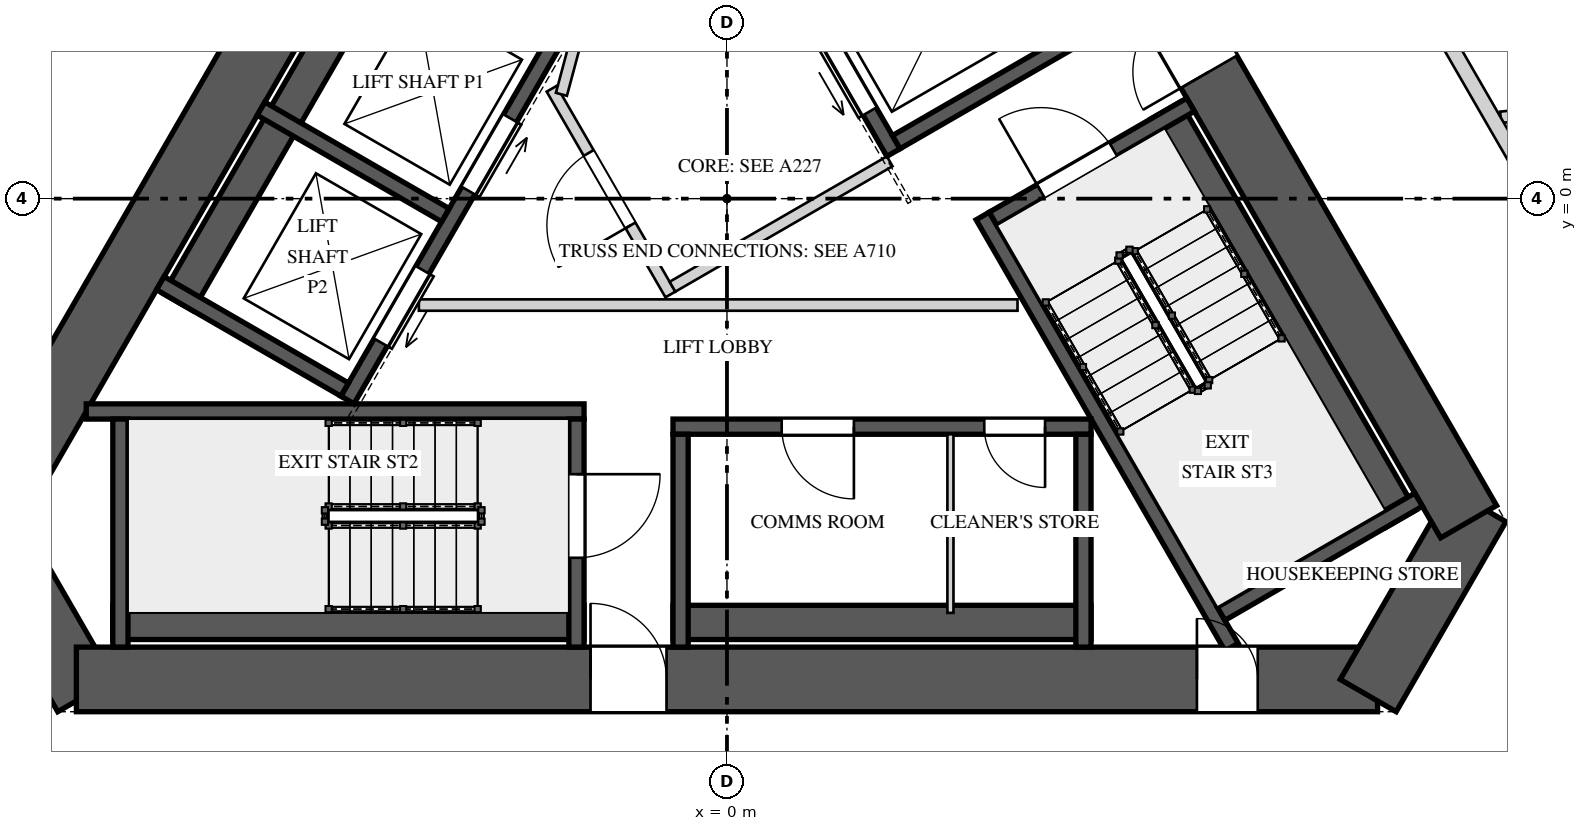
"""IFC4 building model, lengths in metres.
Left out: names, types, materials, properties, quantities, classifications, styles, units other than length and angle.
Written with IfcOpenShell. Run it as: python <this file> out.ifc"""

import sys

from ifc_helpers import new_model, si_unit, direction, frame, frame_2d, origin, place, context, subcontext, project, spatial, rectangle, extrude, element, fill, save


model = new_model("IFC4")
c1 = context("Model", 3, precision=1e-05, world=origin(), true_north=direction((0.0, 1.0)))
c2 = subcontext(c1, "Body", "Model", "MODEL_VIEW")
j1 = project(units=[si_unit("LENGTHUNIT", "METRE"), si_unit("PLANEANGLEUNIT", "RADIAN")], contexts=[c1])
p1 = place(None, origin())
s1 = spatial("IfcSite", under=j1, at=p1, CompositionType="ELEMENT")
p2 = place(p1, origin())
s2 = spatial("IfcBuilding", under=s1, at=p2, CompositionType="ELEMENT")
p3 = place(p2, frame((0.0, 0.0, 194.8)))
s3 = spatial("IfcBuildingStorey", under=s2, at=p3, CompositionType="ELEMENT", Elevation=194.8)
p4 = place(p3, frame((-1.198, 10.575, 0.0), z_axis=(0.0, 0.0, 1.0), x_axis=(-0.499995289315, -0.866028123483, 0.0)))
e1 = element("IfcWall", 1, at=p4, inside=s3, PredefinedType="SHEAR", context=c2, shape_type="SweptSolid", body=[
    extrude(rectangle(XDim=17.118, YDim=0.85, at=frame_2d((8.559, 0.0))), origin(), (0.0, 0.0, 1.0), 5.2),
])
p5 = place(p4, frame((6.764, 0.0, 0.0)))
e2 = element("IfcOpeningElement", 2, at=p5, cuts=e1, PredefinedType="OPENING", context=c2, shape_type="SweptSolid", body=[
    extrude(rectangle(XDim=1.0, YDim=2.4, at=frame_2d((0.5, 1.2))), frame((0.0, 0.435, 0.0), z_axis=(0.0, -1.0, 0.0), x_axis=(1.0, 0.0, 0.0)), (0.0, 0.0, 1.0), 0.87),
])
p6 = place(p3, frame((-9.88, -4.038, 0.0), z_axis=(0.0, 0.0, 1.0), x_axis=(0.499995765644, -0.866027848477, 0.0)))
e3 = element("IfcWall", 3, at=p6, inside=s3, PredefinedType="SHEAR", context=c2, shape_type="SweptSolid", body=[
    extrude(rectangle(XDim=2.887, YDim=0.85, at=frame_2d((1.443, 0.0))), origin(), (0.0, 0.0, 1.0), 5.2),
])
p7 = place(p3, frame((-8.559, -6.325, 0.0), z_axis=(0.0, 0.0, 1.0), x_axis=(1.0, 0.0, 0.0)))
e4 = element("IfcWall", 4, at=p7, inside=s3, PredefinedType="SHEAR", context=c2, shape_type="SweptSolid", body=[
    extrude(rectangle(XDim=17.118, YDim=0.85, at=frame_2d((8.559, 0.0))), origin(), (0.0, 0.0, 1.0), 5.2),
])
p8 = place(p7, frame((6.764, 0.0, 0.0)))
e5 = element("IfcOpeningElement", 5, at=p8, cuts=e4, PredefinedType="OPENING", context=c2, shape_type="SweptSolid", body=[
    extrude(rectangle(XDim=1.0, YDim=2.4, at=frame_2d((0.5, 1.2))), frame((0.0, 0.435, 0.0), z_axis=(0.0, -1.0, 0.0), x_axis=(1.0, 0.0, 0.0)), (0.0, 0.0, 1.0), 0.87),
])
p9 = place(p7, frame((14.742, 0.0, 0.0)))
e6 = element("IfcOpeningElement", 6, at=p9, cuts=e4, PredefinedType="OPENING", context=c2, shape_type="SweptSolid", body=[
    extrude(rectangle(XDim=0.8, YDim=2.1, at=frame_2d((0.4, 1.05))), frame((0.0, 0.435, 0.0), z_axis=(0.0, -1.0, 0.0), x_axis=(1.0, 0.0, 0.0)), (0.0, 0.0, 1.0), 0.87),
])
p10 = place(p3, frame((8.437, -6.538, 0.0), z_axis=(0.0, 0.0, 1.0), x_axis=(0.499995765644, 0.866027848477, 0.0)))
e7 = element("IfcWall", 7, at=p10, inside=s3, PredefinedType="SHEAR", context=c2, shape_type="SweptSolid", body=[
    extrude(rectangle(XDim=2.887, YDim=0.85, at=frame_2d((1.443, 0.0))), origin(), (0.0, 0.0, 1.0), 5.2),
])
p11 = place(p3, frame((9.757, -4.25, 0.0), z_axis=(0.0, 0.0, 1.0), x_axis=(-0.499995289315, 0.866028123483, 0.0)))
e8 = element("IfcWall", 8, at=p11, inside=s3, PredefinedType="SHEAR", context=c2, shape_type="SweptSolid", body=[
    extrude(rectangle(XDim=17.118, YDim=0.85, at=frame_2d((8.559, 0.0))), origin(), (0.0, 0.0, 1.0), 5.2),
])
p12 = place(p11, frame((6.834, 0.0, 0.0)))
e9 = element("IfcOpeningElement", 9, at=p12, cuts=e8, PredefinedType="OPENING", context=c2, shape_type="SweptSolid", body=[
    extrude(rectangle(XDim=1.0, YDim=2.4, at=frame_2d((0.5, 1.2))), frame((0.0, 0.435, 0.0), z_axis=(0.0, -1.0, 0.0), x_axis=(1.0, 0.0, 0.0)), (0.0, 0.0, 1.0), 0.87),
])
p13 = place(p11, frame((14.252, 0.0, 0.0)))
e10 = element("IfcOpeningElement", 10, at=p13, cuts=e8, PredefinedType="OPENING", context=c2, shape_type="SweptSolid", body=[
    extrude(rectangle(XDim=0.8, YDim=2.1, at=frame_2d((0.4, 1.05))), frame((0.0, 0.435, 0.0), z_axis=(0.0, -1.0, 0.0), x_axis=(1.0, 0.0, 0.0)), (0.0, 0.0, 1.0), 0.87),
])
p14 = place(p3, frame((-8.08, -5.575, 0.0), z_axis=(0.0, 0.0, 1.0), x_axis=(1.0, 0.0, 0.0)))
e11 = element("IfcWall", 11, at=p14, inside=s3, PredefinedType="SOLIDWALL", context=c2, shape_type="SweptSolid", body=[
    extrude(rectangle(XDim=6.2, YDim=0.45, at=frame_2d((3.1, 0.0))), origin(), (0.0, 0.0, 1.0), 4.85),
])
p15 = place(p3, frame((-8.429, -2.8, 0.0), z_axis=(0.0, 0.0, 1.0), x_axis=(1.0, 0.0, 0.0)))
e12 = element("IfcWall", 12, at=p15, inside=s3, PredefinedType="SOLIDWALL", context=c2, shape_type="SweptSolid", body=[
    extrude(rectangle(XDim=6.549, YDim=0.2, at=frame_2d((3.275, 0.0))), origin(), (0.0, 0.0, 1.0), 4.85),
])
p16 = place(p3, frame((-7.98, -2.9, 0.0), z_axis=(0.0, 0.0, 1.0), x_axis=(0.0, -1.0, 0.0)))
e13 = element("IfcWall", 13, at=p16, inside=s3, PredefinedType="SOLIDWALL", context=c2, shape_type="SweptSolid", body=[
    extrude(rectangle(XDim=3.0, YDim=0.2, at=frame_2d((1.5, 0.0))), origin(), (0.0, 0.0, 1.0), 4.85),
])
p17 = place(p3, frame((-1.98, -2.9, 0.0), z_axis=(0.0, 0.0, 1.0), x_axis=(0.0, -1.0, 0.0)))
e14 = element("IfcWall", 14, at=p17, inside=s3, PredefinedType="SOLIDWALL", context=c2, shape_type="SweptSolid", body=[
    extrude(rectangle(XDim=3.0, YDim=0.2, at=frame_2d((1.5, 0.0))), origin(), (0.0, 0.0, 1.0), 4.85),
])
p18 = place(p17, frame((0.725, 0.0, 0.0)))
e15 = element("IfcOpeningElement", 15, at=p18, cuts=e14, PredefinedType="OPENING", context=c2, shape_type="SweptSolid", body=[
    extrude(rectangle(XDim=1.1, YDim=2.4, at=frame_2d((0.55, 1.2))), frame((0.0, 0.11, 0.0), z_axis=(0.0, -1.0, 0.0), x_axis=(1.0, 0.0, 0.0)), (0.0, 0.0, 1.0), 0.22),
])
p19 = place(p3, frame((8.868, -4.21, 0.0), z_axis=(0.0, 0.0, 1.0), x_axis=(-0.500009909098, 0.866019682689, 0.0)))
e16 = element("IfcWall", 16, at=p19, inside=s3, PredefinedType="SOLIDWALL", context=c2, shape_type="SweptSolid", body=[
    extrude(rectangle(XDim=6.2, YDim=0.45, at=frame_2d((3.1, 0.0))), origin(), (0.0, 0.0, 1.0), 4.85),
])
p20 = place(p3, frame((6.64, -5.9, 0.0), z_axis=(0.0, 0.0, 1.0), x_axis=(-0.499999959354, 0.866025427251, 0.0)))
e17 = element("IfcWall", 17, at=p20, inside=s3, PredefinedType="SOLIDWALL", context=c2, shape_type="SweptSolid", body=[
    extrude(rectangle(XDim=6.549, YDim=0.2, at=frame_2d((3.275, 0.0))), origin(), (0.0, 0.0, 1.0), 4.85),
])
p21 = place(p3, frame((6.501, -5.461, 0.0), z_axis=(0.0, 0.0, 1.0), x_axis=(0.866031096941, 0.499990139034, 0.0)))
e18 = element("IfcWall", 18, at=p21, inside=s3, PredefinedType="SOLIDWALL", context=c2, shape_type="SweptSolid", body=[
    extrude(rectangle(XDim=3.0, YDim=0.2, at=frame_2d((1.5, 0.0))), origin(), (0.0, 0.0, 1.0), 4.85),
])
p22 = place(p3, frame((3.501, -0.265, 0.0), z_axis=(0.0, 0.0, 1.0), x_axis=(0.866031096941, 0.499990139034, 0.0)))
e19 = element("IfcWall", 19, at=p22, inside=s3, PredefinedType="SOLIDWALL", context=c2, shape_type="SweptSolid", body=[
    extrude(rectangle(XDim=3.0, YDim=0.2, at=frame_2d((1.5, 0.0))), origin(), (0.0, 0.0, 1.0), 4.85),
])
p23 = place(p22, frame((0.725, 0.0, 0.0)))
e20 = element("IfcOpeningElement", 20, at=p23, cuts=e19, PredefinedType="OPENING", context=c2, shape_type="SweptSolid", body=[
    extrude(rectangle(XDim=1.1, YDim=2.4, at=frame_2d((0.55, 1.2))), frame((0.0, 0.11, 0.0), z_axis=(0.0, -1.0, 0.0), x_axis=(1.0, 0.0, 0.0)), (0.0, 0.0, 1.0), 0.22),
])
p24 = place(p3, frame((-2.243, 2.115, 0.0), z_axis=(0.0, 0.0, 1.0), x_axis=(-0.499996545922, -0.866027397988, 0.0)))
e21 = element("IfcWall", 21, at=p24, inside=s3, PredefinedType="SOLIDWALL", context=c2, shape_type="SweptSolid", body=[
    extrude(rectangle(XDim=5.5, YDim=0.2, at=frame_2d((2.75, 0.0))), origin(), (0.0, 0.0, 1.0), 4.85),
])
p25 = place(p24, frame((1.22, 0.0, 0.0)))
e22 = element("IfcOpeningElement", 22, at=p25, cuts=e21, PredefinedType="OPENING", context=c2, shape_type="SweptSolid", body=[
    extrude(rectangle(XDim=1.1, YDim=2.1, at=frame_2d((0.55, 1.05))), frame((0.0, 0.11, 0.0), z_axis=(0.0, -1.0, 0.0), x_axis=(1.0, 0.0, 0.0)), (0.0, 0.0, 1.0), 0.22),
])
p26 = place(p24, frame((3.525, 0.0, 0.0)))
e23 = element("IfcOpeningElement", 23, at=p26, cuts=e21, PredefinedType="OPENING", context=c2, shape_type="SweptSolid", body=[
    extrude(rectangle(XDim=1.1, YDim=2.1, at=frame_2d((0.55, 1.05))), frame((0.0, 0.11, 0.0), z_axis=(0.0, -1.0, 0.0), x_axis=(1.0, 0.0, 0.0)), (0.0, 0.0, 1.0), 0.22),
])
p27 = place(p3, frame((-4.473, 3.402, 0.0), z_axis=(0.0, 0.0, 1.0), x_axis=(-0.499996545922, -0.866027397988, 0.0)))
e24 = element("IfcWall", 24, at=p27, inside=s3, PredefinedType="SOLIDWALL", context=c2, shape_type="SweptSolid", body=[
    extrude(rectangle(XDim=5.5, YDim=0.45, at=frame_2d((2.75, 0.0))), origin(), (0.0, 0.0, 1.0), 4.85),
])
p28 = place(p3, frame((-3.705, -0.217, 0.0), z_axis=(0.0, 0.0, 1.0), x_axis=(-0.866018616679, 0.500011755427, 0.0)))
e25 = element("IfcWall", 25, at=p28, inside=s3, PredefinedType="SOLIDWALL", context=c2, shape_type="SweptSolid", body=[
    extrude(rectangle(XDim=2.8, YDim=0.2, at=frame_2d((1.4, 0.0))), origin(), (0.0, 0.0, 1.0), 4.85),
])
p29 = place(p3, frame((-5.03, -2.512, 0.0), z_axis=(0.0, 0.0, 1.0), x_axis=(-0.865996816683, 0.500049511043, 0.0)))
e26 = element("IfcWall", 26, at=p29, inside=s3, PredefinedType="SOLIDWALL", context=c2, shape_type="SweptSolid", body=[
    extrude(rectangle(XDim=2.8, YDim=0.2, at=frame_2d((1.4, 0.0))), origin(), (0.0, 0.0, 1.0), 4.85),
])
p30 = place(p3, frame((4.79, -3.0, 0.0), z_axis=(0.0, 0.0, 1.0), x_axis=(-1.0, 0.0, 0.0)))
e27 = element("IfcWall", 27, at=p30, inside=s3, PredefinedType="SOLIDWALL", context=c2, shape_type="SweptSolid", body=[
    extrude(rectangle(XDim=5.5, YDim=0.2, at=frame_2d((2.75, 0.0))), origin(), (0.0, 0.0, 1.0), 4.85),
])
p31 = place(p30, frame((3.12, 0.0, 0.0)))
e28 = element("IfcOpeningElement", 28, at=p31, cuts=e27, PredefinedType="OPENING", context=c2, shape_type="SweptSolid", body=[
    extrude(rectangle(XDim=0.95, YDim=2.4, at=frame_2d((0.475, 1.2))), frame((0.0, 0.11, 0.0), z_axis=(0.0, -1.0, 0.0), x_axis=(1.0, 0.0, 0.0)), (0.0, 0.0, 1.0), 0.22),
])
p32 = place(p30, frame((0.605, 0.0, 0.0)))
e29 = element("IfcOpeningElement", 29, at=p32, cuts=e27, PredefinedType="OPENING", context=c2, shape_type="SweptSolid", body=[
    extrude(rectangle(XDim=0.8, YDim=2.1, at=frame_2d((0.4, 1.05))), frame((0.0, 0.11, 0.0), z_axis=(0.0, -1.0, 0.0), x_axis=(1.0, 0.0, 0.0)), (0.0, 0.0, 1.0), 0.22),
])
p33 = place(p3, frame((-0.71, -5.575, 0.0), z_axis=(0.0, 0.0, 1.0), x_axis=(1.0, 0.0, 0.0)))
e30 = element("IfcWall", 30, at=p33, inside=s3, PredefinedType="SOLIDWALL", context=c2, shape_type="SweptSolid", body=[
    extrude(rectangle(XDim=5.5, YDim=0.45, at=frame_2d((2.75, 0.0))), origin(), (0.0, 0.0, 1.0), 4.85),
])
for number, where, z_axis, x_axis in (
    (31, (-0.61, -3.1, 0.0), (0.0, 0.0, 1.0), (0.0, -1.0, 0.0)),
    (32, (4.69, -3.1, 0.0), (0.0, 0.0, 1.0), (0.0, -1.0, 0.0)),
):
    element("IfcWall", number, at=place(p3, frame(where, z_axis=z_axis, x_axis=x_axis)), inside=s3, PredefinedType="SOLIDWALL", context=c2, shape_type="SweptSolid", body=[
        extrude(rectangle(XDim=2.8, YDim=0.2, at=frame_2d((1.4, 0.0))), origin(), (0.0, 0.0, 1.0), 4.85),
    ])
p34 = place(p3, frame((2.94, -3.1, 0.0), z_axis=(0.0, 0.0, 1.0), x_axis=(0.0, -1.0, 0.0)))
e33 = element("IfcWall", 33, at=p34, inside=s3, PredefinedType="PARTITIONING", context=c2, shape_type="SweptSolid", body=[
    extrude(rectangle(XDim=2.35, YDim=0.08, at=frame_2d((1.175, 0.0))), origin(), (0.0, 0.0, 1.0), 4.85),
])
p35 = place(p3, frame((2.19, 0.606, 0.0), z_axis=(0.0, 0.0, 1.0), x_axis=(-0.500002801628, 0.866023786258, 0.0)))
e34 = element("IfcWall", 34, at=p35, inside=s3, PredefinedType="SOLIDWALL", context=c2, shape_type="SweptSolid", body=[
    extrude(rectangle(XDim=4.9, YDim=0.2, at=frame_2d((2.45, 0.0))), origin(), (0.0, 0.0, 1.0), 4.85),
])
p36 = place(p35, frame((0.625, 0.0, 0.0)))
e35 = element("IfcOpeningElement", 35, at=p36, cuts=e34, PredefinedType="OPENING", context=c2, shape_type="SweptSolid", body=[
    extrude(rectangle(XDim=1.3, YDim=2.1, at=frame_2d((0.65, 1.05))), frame((0.0, 0.11, 0.0), z_axis=(0.0, -1.0, 0.0), x_axis=(1.0, 0.0, 0.0)), (0.0, 0.0, 1.0), 0.22),
])
p37 = place(p35, frame((2.975, 0.0, 0.0)))
e36 = element("IfcOpeningElement", 36, at=p37, cuts=e34, PredefinedType="OPENING", context=c2, shape_type="SweptSolid", body=[
    extrude(rectangle(XDim=1.3, YDim=2.1, at=frame_2d((0.65, 1.05))), frame((0.0, 0.11, 0.0), z_axis=(0.0, -1.0, 0.0), x_axis=(1.0, 0.0, 0.0)), (0.0, 0.0, 1.0), 0.22),
])
p38 = place(p3, frame((2.227, 0.743, 0.0), z_axis=(0.0, 0.0, 1.0), x_axis=(0.866018442252, 0.500012057535, 0.0)))
e37 = element("IfcWall", 37, at=p38, inside=s3, PredefinedType="SOLIDWALL", context=c2, shape_type="SweptSolid", body=[
    extrude(rectangle(XDim=3.6, YDim=0.2, at=frame_2d((1.8, 0.0))), origin(), (0.0, 0.0, 1.0), 4.85),
])
p39 = place(p3, frame((-0.744, -1.261, 0.0), z_axis=(0.0, 0.0, 1.0), x_axis=(-0.500004234368, 0.866022959057, 0.0)))
e38 = element("IfcWall", 38, at=p39, inside=s3, PredefinedType="PARTITIONING", context=c2, shape_type="SweptSolid", body=[
    extrude(rectangle(XDim=3.125, YDim=0.15, at=frame_2d((1.562, 0.0))), origin(), (0.0, 0.0, 1.0), 4.85),
])
p40 = place(p39, frame((1.05, 0.0, 0.0)))
e39 = element("IfcOpeningElement", 39, at=p40, cuts=e38, PredefinedType="OPENING", context=c2, shape_type="SweptSolid", body=[
    extrude(rectangle(XDim=1.1, YDim=2.4, at=frame_2d((0.55, 1.2))), frame((0.0, 0.085, 0.0), z_axis=(0.0, -1.0, 0.0), x_axis=(1.0, 0.0, 0.0)), (0.0, 0.0, 1.0), 0.17),
])
p41 = place(p3, frame((-0.717, -1.159, 0.0), z_axis=(0.0, 0.0, 1.0), x_axis=(0.866008176907, 0.50002983664, 0.0)))
e40 = element("IfcWall", 40, at=p41, inside=s3, PredefinedType="PARTITIONING", context=c2, shape_type="SweptSolid", body=[
    extrude(rectangle(XDim=3.3, YDim=0.15, at=frame_2d((1.65, 0.0))), origin(), (0.0, 0.0, 1.0), 4.85),
])
p42 = place(p3, frame((-2.178, 1.372, 0.0), z_axis=(0.0, 0.0, 1.0), x_axis=(0.258808958833, 0.96592852884, 0.0)))
e41 = element("IfcWall", 41, at=p42, inside=s3, PredefinedType="PARTITIONING", context=c2, shape_type="SweptSolid", body=[
    extrude(rectangle(XDim=2.903, YDim=0.15, at=frame_2d((1.451, 0.0))), origin(), (0.0, 0.0, 1.0), 4.85),
])
p43 = place(p3, frame((-4.053, -1.4, 0.0), z_axis=(0.0, 0.0, 1.0), x_axis=(1.0, 0.0, 0.0)))
e42 = element("IfcWall", 42, at=p43, inside=s3, PredefinedType="PARTITIONING", context=c2, shape_type="SweptSolid", body=[
    extrude(rectangle(XDim=7.876, YDim=0.15, at=frame_2d((3.938, 0.0))), origin(), (0.0, 0.0, 1.0), 4.85),
])
p44 = place(p3, frame((10.179, 1.07, 0.0), z_axis=(0.0, 0.0, 1.0), x_axis=(0.994523006427, 0.104517891713, 0.0)))
e43 = element("IfcWall", 43, at=p44, inside=s3, PredefinedType="PARTITIONING", context=c2, shape_type="SweptSolid", body=[
    extrude(rectangle(XDim=8.757, YDim=0.15, at=frame_2d((4.378, 0.0))), origin(), (0.0, 0.0, 1.0), 4.85),
])
p45 = place(p3, frame((8.143, 4.396, 0.0), z_axis=(0.0, 0.0, 1.0), x_axis=(0.499997407846, -0.86602690036, 0.0)))
e44 = element("IfcWall", 44, at=p45, inside=s3, PredefinedType="SOLIDWALL", context=c2, shape_type="SweptSolid", body=[
    extrude(rectangle(XDim=4.791, YDim=0.2, at=frame_2d((2.396, 0.0))), origin(), (0.0, 0.0, 1.0), 4.85),
])
p46 = place(p45, frame((0.775, 0.0, 0.0)))
e45 = element("IfcOpeningElement", 45, at=p46, cuts=e44, PredefinedType="OPENING", context=c2, shape_type="SweptSolid", body=[
    extrude(rectangle(XDim=1.1, YDim=2.2, at=frame_2d((0.55, 1.1))), frame((0.0, 0.11, 0.0), z_axis=(0.0, -1.0, 0.0), x_axis=(1.0, 0.0, 0.0)), (0.0, 0.0, 1.0), 0.22),
])
p47 = place(p3, frame((12.813, -4.807, 0.0), z_axis=(0.0, 0.0, 1.0), x_axis=(-0.499992949462, -0.866029474376, 0.0)))
e46 = element("IfcWall", 46, at=p47, inside=s3, PredefinedType="SOLIDWALL", context=c2, shape_type="SweptSolid", body=[
    extrude(rectangle(XDim=5.13, YDim=0.2, at=frame_2d((2.565, 0.0))), origin(), (0.0, 0.0, 1.0), 4.85),
])
p48 = place(p47, frame((2.342, 0.0, 0.0)))
e47 = element("IfcOpeningElement", 47, at=p48, cuts=e46, PredefinedType="OPENING", context=c2, shape_type="SweptSolid", body=[
    extrude(rectangle(XDim=1.1, YDim=2.2, at=frame_2d((0.55, 1.1))), frame((0.0, 0.11, 0.0), z_axis=(0.0, -1.0, 0.0), x_axis=(1.0, 0.0, 0.0)), (0.0, 0.0, 1.0), 0.22),
])
p49 = place(p18, origin())
e48 = element("IfcDoor", 48, at=p49, inside=s3, OperationType="SINGLE_SWING_LEFT", PredefinedType="DOOR", context=c2, shape_type="SweptSolid", body=[
    extrude(rectangle(XDim=1.1, YDim=2.4, at=frame_2d((0.55, 1.2))), frame((0.0, 0.025, 0.0), z_axis=(0.0, -1.0, 0.0), x_axis=(1.0, 0.0, 0.0)), (0.0, 0.0, 1.0), 0.05),
])
fill(e15, e48)
p50 = place(p23, origin())
e49 = element("IfcDoor", 49, at=p50, inside=s3, OperationType="SINGLE_SWING_RIGHT", PredefinedType="DOOR", context=c2, shape_type="SweptSolid", body=[
    extrude(rectangle(XDim=1.1, YDim=2.4, at=frame_2d((0.55, 1.2))), frame((0.0, 0.025, 0.0), z_axis=(0.0, -1.0, 0.0), x_axis=(1.0, 0.0, 0.0)), (0.0, 0.0, 1.0), 0.05),
])
fill(e20, e49)
p51 = place(p25, origin())
e50 = element("IfcDoor", 50, at=p51, inside=s3, OperationType="SLIDING_TO_LEFT", PredefinedType="DOOR", context=c2, shape_type="SweptSolid", body=[
    extrude(rectangle(XDim=1.1, YDim=2.1, at=frame_2d((0.55, 1.05))), frame((0.0, 0.025, 0.0), z_axis=(0.0, -1.0, 0.0), x_axis=(1.0, 0.0, 0.0)), (0.0, 0.0, 1.0), 0.05),
])
fill(e22, e50)
p52 = place(p26, origin())
e51 = element("IfcDoor", 51, at=p52, inside=s3, OperationType="SLIDING_TO_RIGHT", PredefinedType="DOOR", context=c2, shape_type="SweptSolid", body=[
    extrude(rectangle(XDim=1.1, YDim=2.1, at=frame_2d((0.55, 1.05))), frame((0.0, 0.025, 0.0), z_axis=(0.0, -1.0, 0.0), x_axis=(1.0, 0.0, 0.0)), (0.0, 0.0, 1.0), 0.05),
])
fill(e23, e51)
p53 = place(p31, origin())
e52 = element("IfcDoor", 52, at=p53, inside=s3, OperationType="SINGLE_SWING_LEFT", PredefinedType="DOOR", context=c2, shape_type="SweptSolid", body=[
    extrude(rectangle(XDim=0.95, YDim=2.4, at=frame_2d((0.475, 1.2))), frame((0.0, 0.025, 0.0), z_axis=(0.0, -1.0, 0.0), x_axis=(1.0, 0.0, 0.0)), (0.0, 0.0, 1.0), 0.05),
])
fill(e28, e52)
p54 = place(p32, origin())
e53 = element("IfcDoor", 53, at=p54, inside=s3, OperationType="SINGLE_SWING_RIGHT", PredefinedType="DOOR", context=c2, shape_type="SweptSolid", body=[
    extrude(rectangle(XDim=0.8, YDim=2.1, at=frame_2d((0.4, 1.05))), frame((0.0, 0.025, 0.0), z_axis=(0.0, -1.0, 0.0), x_axis=(1.0, 0.0, 0.0)), (0.0, 0.0, 1.0), 0.05),
])
fill(e29, e53)
p55 = place(p36, origin())
e54 = element("IfcDoor", 54, at=p55, inside=s3, OperationType="SLIDING_TO_LEFT", PredefinedType="DOOR", context=c2, shape_type="SweptSolid", body=[
    extrude(rectangle(XDim=1.3, YDim=2.1, at=frame_2d((0.65, 1.05))), frame((0.0, 0.025, 0.0), z_axis=(0.0, -1.0, 0.0), x_axis=(1.0, 0.0, 0.0)), (0.0, 0.0, 1.0), 0.05),
])
fill(e35, e54)
p56 = place(p40, origin())
e55 = element("IfcDoor", 55, at=p56, inside=s3, OperationType="SINGLE_SWING_LEFT", PredefinedType="DOOR", context=c2, shape_type="SweptSolid", body=[
    extrude(rectangle(XDim=1.1, YDim=2.4, at=frame_2d((0.55, 1.2))), frame((0.0, 0.025, 0.0), z_axis=(0.0, -1.0, 0.0), x_axis=(1.0, 0.0, 0.0)), (0.0, 0.0, 1.0), 0.05),
])
fill(e39, e55)
p57 = place(p8, origin())
e56 = element("IfcDoor", 56, at=p57, inside=s3, OperationType="SINGLE_SWING_LEFT", PredefinedType="DOOR", context=c2, shape_type="SweptSolid", body=[
    extrude(rectangle(XDim=1.0, YDim=2.4, at=frame_2d((0.5, 1.2))), frame((0.0, 0.025, 0.0), z_axis=(0.0, -1.0, 0.0), x_axis=(1.0, 0.0, 0.0)), (0.0, 0.0, 1.0), 0.05),
])
fill(e5, e56)
p58 = place(p12, origin())
e57 = element("IfcDoor", 57, at=p58, inside=s3, OperationType="SINGLE_SWING_RIGHT", PredefinedType="DOOR", context=c2, shape_type="SweptSolid", body=[
    extrude(rectangle(XDim=1.0, YDim=2.4, at=frame_2d((0.5, 1.2))), frame((0.0, 0.025, 0.0), z_axis=(0.0, -1.0, 0.0), x_axis=(1.0, 0.0, 0.0)), (0.0, 0.0, 1.0), 0.05),
])
fill(e9, e57)
p59 = place(p9, origin())
e58 = element("IfcDoor", 58, at=p59, inside=s3, OperationType="SINGLE_SWING_LEFT", PredefinedType="DOOR", context=c2, shape_type="SweptSolid", body=[
    extrude(rectangle(XDim=0.8, YDim=2.1, at=frame_2d((0.4, 1.05))), frame((0.0, 0.025, 0.0), z_axis=(0.0, -1.0, 0.0), x_axis=(1.0, 0.0, 0.0)), (0.0, 0.0, 1.0), 0.05),
])
fill(e6, e58)
save(model, sys.argv[1])
